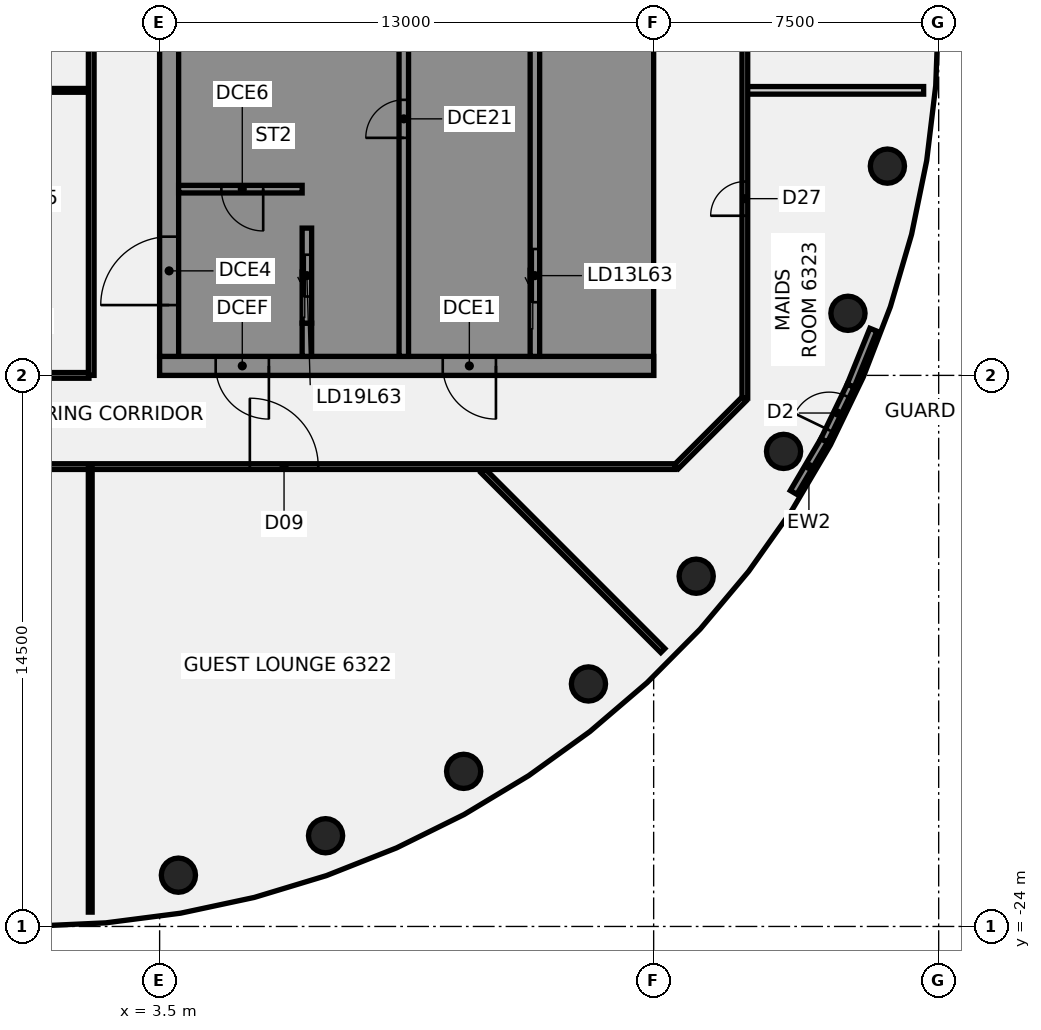
"""IFC4 building model, lengths in metres.
Left out: names, types, materials, properties, quantities, classifications, styles, units other than length and angle.
Written with IfcOpenShell. Run it as: python <this file> out.ifc"""

import sys

from ifc_helpers import new_model, si_unit, direction, frame, frame_2d, origin, origin_2d, place, context, subcontext, project, spatial, polyline, rectangle, circle, outline, extrude, element, fill, save


model = new_model("IFC4")
c1 = context("Model", 3, precision=1e-05, world=origin(), true_north=direction((0.0, 1.0)))
c2 = subcontext(c1, "Body", "Model", "MODEL_VIEW")
j1 = project(units=[si_unit("LENGTHUNIT", "METRE"), si_unit("PLANEANGLEUNIT", "RADIAN")], contexts=[c1])
p1 = place(None, origin())
s1 = spatial("IfcSite", under=j1, at=p1, CompositionType="ELEMENT")
p2 = place(p1, origin())
s2 = spatial("IfcBuilding", under=s1, at=p2, CompositionType="ELEMENT")
p3 = place(p2, frame((0.0, 0.0, 248.7)))
s3 = spatial("IfcBuildingStorey", under=s2, at=p3, CompositionType="ELEMENT", Elevation=248.7)
for number, where, z_axis, x_axis in (
    (1, (3.994, -22.651, -0.14), (0.0, 0.0, 1.0), (1.0, 0.0, 0.0)),
    (2, (7.866, -21.613, -0.14), (0.0, 0.0, 1.0), (1.0, 0.0, 0.0)),
    (3, (11.5, -19.919, -0.14), (0.0, 0.0, 1.0), (1.0, 0.0, 0.0)),
    (4, (14.784, -17.619, -0.14), (0.0, 0.0, 1.0), (1.0, 0.0, 0.0)),
    (5, (17.619, -14.784, -0.14), (0.0, 0.0, 1.0), (1.0, 0.0, 0.0)),
    (6, (19.919, -11.5, -0.14), (0.0, 0.0, 1.0), (1.0, 0.0, 0.0)),
    (7, (21.613, -7.866, -0.14), (0.0, 0.0, 1.0), (1.0, 0.0, 0.0)),
    (8, (22.651, -3.994, -0.14), (0.0, 0.0, 1.0), (1.0, 0.0, 0.0)),
):
    element("IfcColumn", number, at=place(p3, frame(where, z_axis=z_axis, x_axis=x_axis)), inside=s3, PredefinedType="COLUMN", context=c2, shape_type="SweptSolid", body=[
        extrude(circle(Radius=0.45, at=origin_2d()), origin(), (0.0, 0.0, 1.0), 3.56),
    ])
p4 = place(p3, frame((12.01, -12.01, 0.0), z_axis=(0.0, 0.0, 1.0), x_axis=(0.707106781187, -0.707106781187, 0.0)))
e9 = element("IfcWall", 9, at=p4, inside=s3, PredefinedType="PARTITIONING", context=c2, shape_type="SweptSolid", body=[
    extrude(rectangle(XDim=6.691, YDim=0.15, at=frame_2d((3.345, 0.0))), origin(), (0.0, 0.0, 1.0), 2.824),
])
p5 = place(p3, frame((-17.1, -11.9, 0.0), z_axis=(0.0, 0.0, 1.0), x_axis=(1.0, 0.0, 0.0)))
e10 = element("IfcWall", 10, at=p5, inside=s3, PredefinedType="PARTITIONING", context=c2, shape_type="SweptSolid", body=[
    extrude(rectangle(XDim=34.165, YDim=0.15, at=frame_2d((17.083, 0.0))), origin(), (0.0, 0.0, 1.0), 2.824),
])
p6 = place(p5, frame((5.8, 0.0, 0.0)))
e11 = element("IfcOpeningElement", 11, at=p6, cuts=e10, PredefinedType="OPENING", context=c2, shape_type="SweptSolid", body=[
    extrude(rectangle(XDim=1.8, YDim=2.1, at=frame_2d((0.9, 1.05))), frame((0.0, 0.085, 0.0), z_axis=(0.0, -1.0, 0.0), x_axis=(1.0, 0.0, 0.0)), (0.0, 0.0, 1.0), 0.17),
])
p7 = place(p5, frame((12.909, 0.0, 0.0)))
e12 = element("IfcOpeningElement", 12, at=p7, cuts=e10, PredefinedType="OPENING", context=c2, shape_type="SweptSolid", body=[
    extrude(rectangle(XDim=1.8, YDim=2.1, at=frame_2d((0.9, 1.05))), frame((0.0, 0.085, 0.0), z_axis=(0.0, -1.0, 0.0), x_axis=(1.0, 0.0, 0.0)), (0.0, 0.0, 1.0), 0.17),
])
p8 = place(p5, frame((22.974, 0.0, 0.0)))
e13 = element("IfcOpeningElement", 13, at=p8, cuts=e10, PredefinedType="OPENING", context=c2, shape_type="SweptSolid", body=[
    extrude(rectangle(XDim=1.8, YDim=2.1, at=frame_2d((0.9, 1.05))), frame((0.0, 0.085, 0.0), z_axis=(0.0, -1.0, 0.0), x_axis=(1.0, 0.0, 0.0)), (0.0, 0.0, 1.0), 0.17),
])
p9 = place(p5, frame((2.85, 0.0, 0.0)))
e14 = element("IfcOpeningElement", 14, at=p9, cuts=e10, PredefinedType="OPENING", context=c2, shape_type="SweptSolid", body=[
    extrude(rectangle(XDim=0.9, YDim=2.1, at=frame_2d((0.45, 1.05))), frame((0.0, 0.085, 0.0), z_axis=(0.0, -1.0, 0.0), x_axis=(1.0, 0.0, 0.0)), (0.0, 0.0, 1.0), 0.17),
])
p10 = place(p3, frame((-1.64, -9.5, 0.0), z_axis=(0.0, 0.0, 1.0), x_axis=(1.0, 0.0, 0.0)))
e15 = element("IfcWall", 15, at=p10, inside=s3, PredefinedType="PARTITIONING", context=c2, shape_type="SweptSolid", body=[
    extrude(rectangle(XDim=3.28, YDim=0.15, at=frame_2d((1.64, 0.0))), origin(), (0.0, 0.0, 1.0), 2.824),
])
p11 = place(p3, frame((-1.64, -2.0, 0.0), z_axis=(0.0, 0.0, 1.0), x_axis=(1.0, 0.0, 0.0)))
e16 = element("IfcWall", 16, at=p11, inside=s3, PredefinedType="PARTITIONING", context=c2, shape_type="SweptSolid", body=[
    extrude(rectangle(XDim=3.28, YDim=0.1, at=frame_2d((1.64, 0.0))), origin(), (0.0, 0.0, 1.0), 2.824),
])
p12 = place(p3, frame((18.955, -2.0, 0.0), z_axis=(0.0, 0.0, 1.0), x_axis=(1.0, 0.0, 0.0)))
e17 = element("IfcWall", 17, at=p12, inside=s3, PredefinedType="PARTITIONING", context=c2, shape_type="SweptSolid", body=[
    extrude(rectangle(XDim=4.649, YDim=0.2, at=frame_2d((2.325, 0.0))), origin(), (0.0, 0.0, 1.0), 2.824),
])
p13 = place(p3, frame((17.1, -11.9, 0.0), z_axis=(0.0, 0.0, 1.0), x_axis=(0.707106781187, 0.707106781187, 0.0)))
e18 = element("IfcWall", 18, at=p13, inside=s3, PredefinedType="PARTITIONING", context=c2, shape_type="SweptSolid", body=[
    extrude(rectangle(XDim=2.505, YDim=0.15, at=frame_2d((1.253, 0.0))), origin(), (0.0, 0.0, 1.0), 2.824),
])
p14 = place(p3, frame((1.674, -23.623, 0.0), z_axis=(0.0, 0.0, 1.0), x_axis=(0.0, 1.0, 0.0)))
e19 = element("IfcWall", 19, at=p14, inside=s3, PredefinedType="PARTITIONING", context=c2, shape_type="SweptSolid", body=[
    extrude(rectangle(XDim=11.668, YDim=0.1, at=frame_2d((5.834, 0.0))), origin(), (0.0, 0.0, 1.0), 2.824),
])
p15 = place(p3, frame((1.7, -9.5, 0.0), z_axis=(0.0, 0.0, 1.0), x_axis=(0.0, 1.0, 0.0)))
e20 = element("IfcWall", 20, at=p15, inside=s3, PredefinedType="PARTITIONING", context=c2, shape_type="SweptSolid", body=[
    extrude(rectangle(XDim=19.0, YDim=0.15, at=frame_2d((9.5, 0.0))), origin(), (0.0, 0.0, 1.0), 2.824),
])
p16 = place(p3, frame((18.9, -10.1, 0.0), z_axis=(0.0, 0.0, 1.0), x_axis=(0.0, 1.0, 0.0)))
e21 = element("IfcWall", 21, at=p16, inside=s3, PredefinedType="PARTITIONING", context=c2, shape_type="SweptSolid", body=[
    extrude(rectangle(XDim=20.2, YDim=0.15, at=frame_2d((10.1, 0.0))), origin(), (0.0, 0.0, 1.0), 2.824),
])
p17 = place(p16, frame((4.8, 0.0, 0.0)))
e22 = element("IfcOpeningElement", 22, at=p17, cuts=e21, PredefinedType="OPENING", context=c2, shape_type="SweptSolid", body=[
    extrude(rectangle(XDim=0.9, YDim=2.1, at=frame_2d((0.45, 1.05))), frame((0.0, 0.085, 0.0), z_axis=(0.0, -1.0, 0.0), x_axis=(1.0, 0.0, 0.0)), (0.0, 0.0, 1.0), 0.17),
])
p18 = place(p16, frame((10.211, 0.0, 0.0)))
e23 = element("IfcOpeningElement", 23, at=p18, cuts=e21, PredefinedType="OPENING", context=c2, shape_type="SweptSolid", body=[
    extrude(rectangle(XDim=0.9, YDim=2.1, at=frame_2d((0.45, 1.05))), frame((0.0, 0.085, 0.0), z_axis=(0.0, -1.0, 0.0), x_axis=(1.0, 0.0, 0.0)), (0.0, 0.0, 1.0), 0.17),
])
p19 = place(p3, frame((20.183, -12.58, 0.0), z_axis=(0.0, 0.0, 1.0), x_axis=(0.50690596754, 0.86200135735, 0.0)))
e24 = element("IfcWall", 24, at=p19, inside=s3, PredefinedType="SOLIDWALL", context=c2, shape_type="SweptSolid", body=[
    extrude(rectangle(XDim=1.589, YDim=0.2, at=frame_2d((0.794, 0.0))), origin(), (0.0, 0.0, 1.0), 3.42),
])
p20 = place(p3, frame((21.685, -9.77, 0.0), z_axis=(0.0, 0.0, 1.0), x_axis=(0.375865678764, 0.92667415607, 0.0)))
e25 = element("IfcWall", 25, at=p20, inside=s3, PredefinedType="SOLIDWALL", context=c2, shape_type="SweptSolid", body=[
    extrude(rectangle(XDim=1.588, YDim=0.2, at=frame_2d((0.794, 0.0))), origin(), (0.0, 0.0, 1.0), 3.42),
])
p21 = place(p3, frame((20.988, -11.211, 0.0), z_axis=(0.0, 0.0, 1.0), x_axis=(0.435333576099, 0.900269225021, 0.0)))
e26 = element("IfcWall", 26, at=p21, inside=s3, PredefinedType="SOLIDWALL", context=c2, shape_type="SweptSolid", body=[
    extrude(rectangle(XDim=1.6, YDim=0.2, at=frame_2d((0.8, 0.0))), origin(), (0.0, 0.0, 1.0), 3.42),
])
p22 = place(p21, frame((0.3, 0.0, 0.0)))
e27 = element("IfcOpeningElement", 27, at=p22, cuts=e26, PredefinedType="OPENING", context=c2, shape_type="SweptSolid", body=[
    extrude(rectangle(XDim=1.0, YDim=2.4, at=frame_2d((0.5, 1.2))), frame((0.0, 0.11, 0.0), z_axis=(0.0, -1.0, 0.0), x_axis=(1.0, 0.0, 0.0)), (0.0, 0.0, 1.0), 0.22),
])
p23 = place(p3, frame((16.5, -9.25, 0.0), z_axis=(0.0, 0.0, 1.0), x_axis=(-1.0, 0.0, 0.0)))
e28 = element("IfcWall", 28, at=p23, inside=s3, PredefinedType="SHEAR", context=c2, shape_type="SweptSolid", body=[
    extrude(rectangle(XDim=13.0, YDim=0.5, at=frame_2d((6.5, 0.0))), origin(), (0.0, 0.0, 1.0), 3.42),
])
p24 = place(p23, frame((4.15, 0.0, 0.0)))
e29 = element("IfcOpeningElement", 29, at=p24, cuts=e28, PredefinedType="OPENING", context=c2, shape_type="SweptSolid", body=[
    extrude(rectangle(XDim=1.4, YDim=2.1, at=frame_2d((0.7, 1.05))), frame((0.0, 0.26, 0.0), z_axis=(0.0, -1.0, 0.0), x_axis=(1.0, 0.0, 0.0)), (0.0, 0.0, 1.0), 0.52),
])
p25 = place(p23, frame((10.125, 0.0, 0.0)))
e30 = element("IfcOpeningElement", 30, at=p25, cuts=e28, PredefinedType="OPENING", context=c2, shape_type="SweptSolid", body=[
    extrude(rectangle(XDim=1.4, YDim=2.1, at=frame_2d((0.7, 1.05))), frame((0.0, 0.26, 0.0), z_axis=(0.0, -1.0, 0.0), x_axis=(1.0, 0.0, 0.0)), (0.0, 0.0, 1.0), 0.52),
])
p26 = place(p3, origin())
e31 = element("IfcWall", 31, at=p26, inside=s3, PredefinedType="SHEAR", context=c2, shape_type="SweptSolid", body=[
    extrude(outline(polyline([(13.5, -8.125), (13.5, -9.0), (16.0, -9.0), (16.5, -9.0), (16.5, 9.0), (16.0, 9.0), (13.5, 9.0), (13.5, 8.125), (16.0, 8.125), (16.0, 5.625), (13.5, 5.625), (13.5, 5.375), (16.0, 5.375), (16.0, -5.375), (13.5, -5.375), (13.5, -5.625), (16.0, -5.625), (16.0, -8.125), (13.5, -8.125)])), origin(), (0.0, 0.0, 1.0), 3.42),
])
p27 = place(p3, origin())
e32 = element("IfcWall", 32, at=p27, inside=s3, PredefinedType="SHEAR", context=c2, shape_type="SweptSolid", body=[
    extrude(outline(polyline([(9.8, -5.375), (7.5, -5.375), (7.5, 2.625), (9.8, 2.625), (9.8, 2.875), (7.5, 2.875), (7.5, 5.375), (9.8, 5.375), (9.8, 5.625), (7.5, 5.625), (7.5, 8.125), (9.8, 8.125), (9.8, 9.0), (7.5, 9.0), (7.25, 9.0), (7.25, -5.625), (7.5, -5.625), (9.8, -5.625), (9.8, -5.375)])), origin(), (0.0, 0.0, 1.0), 3.42),
])
p28 = place(p3, origin())
e33 = element("IfcWall", 33, at=p28, inside=s3, PredefinedType="SHEAR", context=c2, shape_type="SweptSolid", body=[
    extrude(outline(polyline([(7.5, -8.125), (7.5, -9.0), (9.8, -9.0), (9.8, -8.125), (9.8, -5.625), (9.55, -5.625), (9.55, -8.125), (7.5, -8.125)])), origin(), (0.0, 0.0, 1.0), 3.42),
])
p29 = place(p3, frame((7.375, -9.0, 0.0), z_axis=(0.0, 0.0, 1.0), x_axis=(0.0, 1.0, 0.0)))
e34 = element("IfcWall", 34, at=p29, inside=s3, PredefinedType="SHEAR", context=c2, shape_type="SweptSolid", body=[
    extrude(rectangle(XDim=0.875, YDim=0.25, at=frame_2d((0.438, 0.0))), origin(), (0.0, 0.0, 1.0), 3.42),
])
p30 = place(p3, frame((13.375, -9.0, 0.0), z_axis=(0.0, 0.0, 1.0), x_axis=(0.0, 1.0, 0.0)))
e35 = element("IfcWall", 35, at=p30, inside=s3, PredefinedType="SHEAR", context=c2, shape_type="SweptSolid", body=[
    extrude(rectangle(XDim=18.0, YDim=0.25, at=frame_2d((9.0, 0.0))), origin(), (0.0, 0.0, 1.0), 3.42),
])
p31 = place(p30, frame((1.425, 0.0, 0.0)))
e36 = element("IfcOpeningElement", 36, at=p31, cuts=e35, PredefinedType="OPENING", context=c2, shape_type="SweptSolid", body=[
    extrude(rectangle(XDim=1.4, YDim=2.1, at=frame_2d((0.7, 1.05))), frame((0.0, 0.135, 0.0), z_axis=(0.0, -1.0, 0.0), x_axis=(1.0, 0.0, 0.0)), (0.0, 0.0, 1.0), 0.27),
])
p32 = place(p30, frame((8.5, 0.0, 0.0)))
e37 = element("IfcOpeningElement", 37, at=p32, cuts=e35, PredefinedType="OPENING", context=c2, shape_type="SweptSolid", body=[
    extrude(rectangle(XDim=1.0, YDim=2.1, at=frame_2d((0.5, 1.05))), frame((0.0, 0.135, 0.0), z_axis=(0.0, -1.0, 0.0), x_axis=(1.0, 0.0, 0.0)), (0.0, 0.0, 1.0), 0.27),
])
p33 = place(p3, frame((9.925, -9.0, 0.0), z_axis=(0.0, 0.0, 1.0), x_axis=(0.0, 1.0, 0.0)))
e38 = element("IfcWall", 38, at=p33, inside=s3, PredefinedType="SHEAR", context=c2, shape_type="SweptSolid", body=[
    extrude(rectangle(XDim=18.0, YDim=0.25, at=frame_2d((9.0, 0.0))), origin(), (0.0, 0.0, 1.0), 3.42),
])
p34 = place(p33, frame((12.575, 0.0, 0.0)))
e39 = element("IfcOpeningElement", 39, at=p34, cuts=e38, PredefinedType="OPENING", context=c2, shape_type="SweptSolid", body=[
    extrude(rectangle(XDim=1.1, YDim=2.1, at=frame_2d((0.55, 1.05))), frame((0.0, 0.135, 0.0), z_axis=(0.0, -1.0, 0.0), x_axis=(1.0, 0.0, 0.0)), (0.0, 0.0, 1.0), 0.27),
])
p35 = place(p33, frame((15.325, 0.0, 0.0)))
e40 = element("IfcOpeningElement", 40, at=p35, cuts=e38, PredefinedType="OPENING", context=c2, shape_type="SweptSolid", body=[
    extrude(rectangle(XDim=1.1, YDim=2.1, at=frame_2d((0.55, 1.05))), frame((0.0, 0.135, 0.0), z_axis=(0.0, -1.0, 0.0), x_axis=(1.0, 0.0, 0.0)), (0.0, 0.0, 1.0), 0.27),
])
p36 = place(p33, frame((5.75, 0.0, 0.0)))
e41 = element("IfcOpeningElement", 41, at=p36, cuts=e38, PredefinedType="OPENING", context=c2, shape_type="SweptSolid", body=[
    extrude(rectangle(XDim=1.0, YDim=2.1, at=frame_2d((0.5, 1.05))), frame((0.0, 0.135, 0.0), z_axis=(0.0, -1.0, 0.0), x_axis=(1.0, 0.0, 0.0)), (0.0, 0.0, 1.0), 0.27),
])
p37 = place(p33, frame((9.875, 0.0, 0.0)))
e42 = element("IfcOpeningElement", 42, at=p37, cuts=e38, PredefinedType="OPENING", context=c2, shape_type="SweptSolid", body=[
    extrude(rectangle(XDim=1.0, YDim=2.1, at=frame_2d((0.5, 1.05))), frame((0.0, 0.135, 0.0), z_axis=(0.0, -1.0, 0.0), x_axis=(1.0, 0.0, 0.0)), (0.0, 0.0, 1.0), 0.27),
])
p38 = place(p3, frame((7.375, -8.125, 0.0), z_axis=(0.0, 0.0, 1.0), x_axis=(0.0, 1.0, 0.0)))
e43 = element("IfcWall", 43, at=p38, inside=s3, PredefinedType="SHEAR", context=c2, shape_type="SweptSolid", body=[
    extrude(rectangle(XDim=2.5, YDim=0.25, at=frame_2d((1.25, 0.0))), origin(), (0.0, 0.0, 1.0), 3.42),
])
p39 = place(p38, frame((0.7, 0.0, 0.0)))
e44 = element("IfcOpeningElement", 44, at=p39, cuts=e43, PredefinedType="OPENING", context=c2, shape_type="SweptSolid", body=[
    extrude(rectangle(XDim=1.1, YDim=2.1, at=frame_2d((0.55, 1.05))), frame((0.0, 0.135, 0.0), z_axis=(0.0, -1.0, 0.0), x_axis=(1.0, 0.0, 0.0)), (0.0, 0.0, 1.0), 0.27),
])
p40 = place(p3, frame((3.75, -9.0, 0.0), z_axis=(0.0, 0.0, 1.0), x_axis=(0.0, 1.0, 0.0)))
e45 = element("IfcWall", 45, at=p40, inside=s3, PredefinedType="SHEAR", context=c2, shape_type="SweptSolid", body=[
    extrude(rectangle(XDim=18.0, YDim=0.5, at=frame_2d((9.0, 0.0))), origin(), (0.0, 0.0, 1.0), 3.42),
])
p41 = place(p40, frame((1.35, 0.0, 0.0)))
e46 = element("IfcOpeningElement", 46, at=p41, cuts=e45, PredefinedType="OPENING", context=c2, shape_type="SweptSolid", body=[
    extrude(rectangle(XDim=1.8, YDim=2.1, at=frame_2d((0.9, 1.05))), frame((0.0, 0.26, 0.0), z_axis=(0.0, -1.0, 0.0), x_axis=(1.0, 0.0, 0.0)), (0.0, 0.0, 1.0), 0.52),
])
p42 = place(p40, frame((11.798, 0.0, 0.0)))
e47 = element("IfcOpeningElement", 47, at=p42, cuts=e45, PredefinedType="OPENING", context=c2, shape_type="SweptSolid", body=[
    extrude(rectangle(XDim=1.0, YDim=2.1, at=frame_2d((0.5, 1.05))), frame((0.0, 0.26, 0.0), z_axis=(0.0, -1.0, 0.0), x_axis=(1.0, 0.0, 0.0)), (0.0, 0.0, 1.0), 0.52),
])
p43 = place(p40, frame((15.323, 0.0, 0.0)))
e48 = element("IfcOpeningElement", 48, at=p43, cuts=e45, PredefinedType="OPENING", context=c2, shape_type="SweptSolid", body=[
    extrude(rectangle(XDim=1.0, YDim=2.1, at=frame_2d((0.5, 1.05))), frame((0.0, 0.26, 0.0), z_axis=(0.0, -1.0, 0.0), x_axis=(1.0, 0.0, 0.0)), (0.0, 0.0, 1.0), 0.52),
])
p44 = place(p3, frame((7.25, -4.6, 0.0), z_axis=(0.0, 0.0, 1.0), x_axis=(-1.0, 0.0, 0.0)))
e49 = element("IfcWall", 49, at=p44, inside=s3, PredefinedType="SHEAR", context=c2, shape_type="SweptSolid", body=[
    extrude(rectangle(XDim=3.25, YDim=0.2, at=frame_2d((1.625, 0.0))), origin(), (0.0, 0.0, 1.0), 3.42),
])
p45 = place(p44, frame((1.025, 0.0, 0.0)))
e50 = element("IfcOpeningElement", 50, at=p45, cuts=e49, PredefinedType="OPENING", context=c2, shape_type="SweptSolid", body=[
    extrude(rectangle(XDim=1.1, YDim=2.1, at=frame_2d((0.55, 1.05))), frame((0.0, 0.11, 0.0), z_axis=(0.0, -1.0, 0.0), x_axis=(1.0, 0.0, 0.0)), (0.0, 0.0, 1.0), 0.22),
])
p46 = place(p8, frame((1.8, 0.0, 0.0), z_axis=(0.0, 0.0, 1.0), x_axis=(-1.0, 0.0, 0.0)))
e51 = element("IfcDoor", 51, at=p46, inside=s3, OperationType="DOUBLE_DOOR_SINGLE_SWING", PredefinedType="DOOR", context=c2, shape_type="SweptSolid", body=[
    extrude(rectangle(XDim=1.8, YDim=2.1, at=frame_2d((0.9, 1.05))), frame((0.0, 0.025, 0.0), z_axis=(0.0, -1.0, 0.0), x_axis=(1.0, 0.0, 0.0)), (0.0, 0.0, 1.0), 0.05),
])
fill(e13, e51)
p47 = place(p17, frame((0.9, 0.0, 0.0), z_axis=(0.0, 0.0, 1.0), x_axis=(-1.0, 0.0, 0.0)))
e52 = element("IfcDoor", 52, at=p47, inside=s3, OperationType="SINGLE_SWING_LEFT", PredefinedType="DOOR", context=c2, shape_type="SweptSolid", body=[
    extrude(rectangle(XDim=0.9, YDim=2.1, at=frame_2d((0.45, 1.05))), frame((0.0, 0.025, 0.0), z_axis=(0.0, -1.0, 0.0), x_axis=(1.0, 0.0, 0.0)), (0.0, 0.0, 1.0), 0.05),
])
fill(e22, e52)
p48 = place(p22, origin())
e53 = element("IfcDoor", 53, at=p48, inside=s3, OperationType="SINGLE_SWING_LEFT", PredefinedType="DOOR", context=c2, shape_type="SweptSolid", body=[
    extrude(rectangle(XDim=1.0, YDim=2.4, at=frame_2d((0.5, 1.2))), frame((0.0, 0.025, 0.0), z_axis=(0.0, -1.0, 0.0), x_axis=(1.0, 0.0, 0.0)), (0.0, 0.0, 1.0), 0.05),
])
fill(e27, e53)
p49 = place(p24, origin())
e54 = element("IfcDoor", 54, at=p49, inside=s3, OperationType="SINGLE_SWING_LEFT", PredefinedType="DOOR", context=c2, shape_type="SweptSolid", body=[
    extrude(rectangle(XDim=1.4, YDim=2.1, at=frame_2d((0.7, 1.05))), frame((0.0, 0.025, 0.0), z_axis=(0.0, -1.0, 0.0), x_axis=(1.0, 0.0, 0.0)), (0.0, 0.0, 1.0), 0.05),
])
fill(e29, e54)
p50 = place(p25, origin())
e55 = element("IfcDoor", 55, at=p50, inside=s3, OperationType="SINGLE_SWING_LEFT", PredefinedType="DOOR", context=c2, shape_type="SweptSolid", body=[
    extrude(rectangle(XDim=1.4, YDim=2.1, at=frame_2d((0.7, 1.05))), frame((0.0, 0.025, 0.0), z_axis=(0.0, -1.0, 0.0), x_axis=(1.0, 0.0, 0.0)), (0.0, 0.0, 1.0), 0.05),
])
fill(e30, e55)
p51 = place(p41, origin())
e56 = element("IfcDoor", 56, at=p51, inside=s3, OperationType="SINGLE_SWING_LEFT", PredefinedType="DOOR", context=c2, shape_type="SweptSolid", body=[
    extrude(rectangle(XDim=1.8, YDim=2.1, at=frame_2d((0.9, 1.05))), frame((0.0, 0.025, 0.0), z_axis=(0.0, -1.0, 0.0), x_axis=(1.0, 0.0, 0.0)), (0.0, 0.0, 1.0), 0.05),
])
fill(e46, e56)
p52 = place(p45, origin())
e57 = element("IfcDoor", 57, at=p52, inside=s3, OperationType="SINGLE_SWING_LEFT", PredefinedType="DOOR", context=c2, shape_type="SweptSolid", body=[
    extrude(rectangle(XDim=1.1, YDim=2.1, at=frame_2d((0.55, 1.05))), frame((0.0, 0.025, 0.0), z_axis=(0.0, -1.0, 0.0), x_axis=(1.0, 0.0, 0.0)), (0.0, 0.0, 1.0), 0.05),
])
fill(e50, e57)
p53 = place(p31, origin())
e58 = element("IfcDoor", 58, at=p53, inside=s3, OperationType="SLIDING_TO_LEFT", PredefinedType="DOOR", context=c2, shape_type="SweptSolid", body=[
    extrude(rectangle(XDim=1.4, YDim=2.1, at=frame_2d((0.7, 1.05))), frame((0.0, 0.025, 0.0), z_axis=(0.0, -1.0, 0.0), x_axis=(1.0, 0.0, 0.0)), (0.0, 0.0, 1.0), 0.05),
])
fill(e36, e58)
p54 = place(p39, origin())
e59 = element("IfcDoor", 59, at=p54, inside=s3, OperationType="SLIDING_TO_LEFT", PredefinedType="DOOR", context=c2, shape_type="SweptSolid", body=[
    extrude(rectangle(XDim=1.1, YDim=2.1, at=frame_2d((0.55, 1.05))), frame((0.0, 0.025, 0.0), z_axis=(0.0, -1.0, 0.0), x_axis=(1.0, 0.0, 0.0)), (0.0, 0.0, 1.0), 0.05),
])
fill(e44, e59)
p55 = place(p36, origin())
e60 = element("IfcDoor", 60, at=p55, inside=s3, OperationType="SINGLE_SWING_LEFT", PredefinedType="DOOR", context=c2, shape_type="SweptSolid", body=[
    extrude(rectangle(XDim=1.0, YDim=2.1, at=frame_2d((0.5, 1.05))), frame((0.0, 0.025, 0.0), z_axis=(0.0, -1.0, 0.0), x_axis=(1.0, 0.0, 0.0)), (0.0, 0.0, 1.0), 0.05),
])
fill(e41, e60)
save(model, sys.argv[1])
